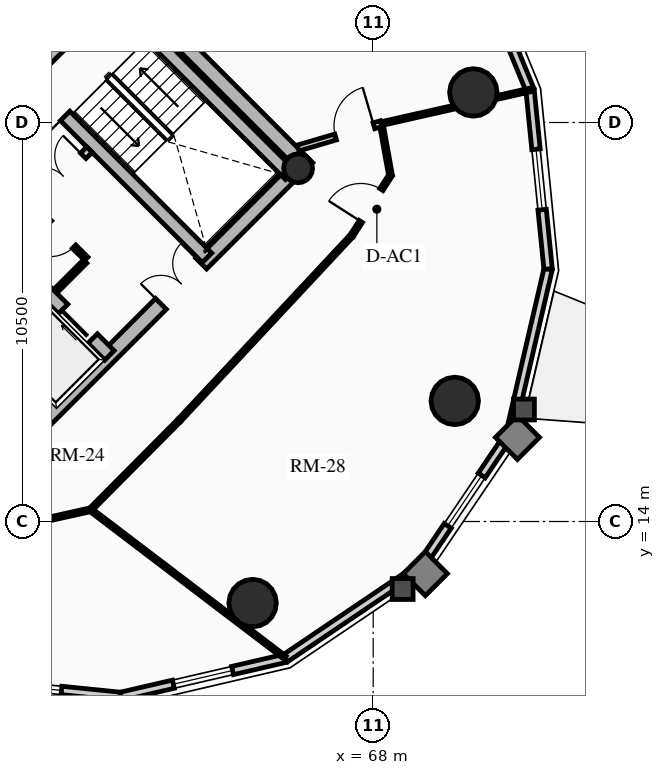
"""IFC4 building model, lengths in metres.
Left out: names, types, materials, properties, quantities, classifications, styles, units other than length and angle.
Written with IfcOpenShell. Run it as: python <this file> out.ifc"""

import sys

from ifc_helpers import new_model, si_unit, direction, frame, frame_2d, origin, origin_2d, place, context, subcontext, project, spatial, rectangle, circle, hollow_circle, extrude, source, transform, mapped, element, fill, save


model = new_model("IFC4")
c1 = context("Model", 3, precision=1e-05, world=origin(), true_north=direction((0.0, 1.0)))
c2 = subcontext(c1, "Body", "Model", "MODEL_VIEW")
j1 = project(units=[si_unit("LENGTHUNIT", "METRE"), si_unit("PLANEANGLEUNIT", "RADIAN")], contexts=[c1])
p1 = place(None, origin())
s1 = spatial("IfcSite", under=j1, at=p1, CompositionType="ELEMENT")
p2 = place(p1, origin())
s2 = spatial("IfcBuilding", under=s1, at=p2, CompositionType="ELEMENT")
p3 = place(p2, frame((0.0, 0.0, 186.52)))
s3 = spatial("IfcBuildingStorey", under=s2, at=p3, CompositionType="ELEMENT", Elevation=186.52)
p4 = place(p3, frame((66.268, 23.298, 0.0), z_axis=(0.0, 0.0, 1.0), x_axis=(-0.707106781187, 0.707106781187, 0.0)))
e1 = element("IfcWall", 1, at=p4, inside=s3, PredefinedType="SHEAR", context=c2, shape_type="SweptSolid", body=[
    extrude(rectangle(XDim=14.1, YDim=0.4, at=frame_2d((7.05, 0.0))), origin(), (0.0, 0.0, 1.0), 2.91),
])
p5 = place(p3, frame((58.561, 15.873, 0.0), z_axis=(0.0, 0.0, 1.0), x_axis=(0.707106781187, 0.707106781187, 0.0)))
e2 = element("IfcWall", 2, at=p5, inside=s3, PredefinedType="SHEAR", context=c2, shape_type="SweptSolid", body=[
    extrude(rectangle(XDim=10.7, YDim=0.4, at=frame_2d((5.35, 0.0))), origin(), (0.0, 0.0, 1.0), 2.91),
])
m1 = source(origin(), c2, "Body", "SweptSolid", [
    extrude(rectangle(XDim=1.5, YDim=2.02, at=frame_2d((0.75, 1.01))), frame((0.0, 0.21, 0.0), z_axis=(0.0, -1.0, 0.0), x_axis=(1.0, 0.0, 0.0)), (0.0, 0.0, 1.0), 0.42),
])
p6 = place(p5, frame((5.45, 0.0, 0.0)))
e3 = element("IfcOpeningElement", 3, at=p6, cuts=e2, PredefinedType="OPENING", context=c2, shape_type="MappedRepresentation", body=[
    mapped(m1, transform((0.0, 0.0, 0.0), x_axis=(1.0, 0.0, 0.0), y_axis=(0.0, 1.0, 0.0), z_axis=(0.0, 0.0, 1.0), scale=1.0)),
])
p7 = place(p3, frame((61.06, 18.373, 0.0), z_axis=(0.0, 0.0, 1.0), x_axis=(-0.707106781187, 0.707106781187, 0.0)))
e4 = element("IfcWall", 4, at=p7, inside=s3, PredefinedType="SHEAR", context=c2, shape_type="SweptSolid", body=[
    extrude(rectangle(XDim=13.7, YDim=0.35, at=frame_2d((6.85, 0.0))), origin(), (0.0, 0.0, 1.0), 2.91),
])
m2 = source(origin(), c2, "Body", "SweptSolid", [
    extrude(rectangle(XDim=1.1, YDim=2.015, at=frame_2d((0.55, 1.007))), frame((0.0, 0.185, 0.0), z_axis=(0.0, -1.0, 0.0), x_axis=(1.0, 0.0, 0.0)), (0.0, 0.0, 1.0), 0.37),
])
p8 = place(p7, frame((4.85, 0.0, 0.0)))
e5 = element("IfcOpeningElement", 5, at=p8, cuts=e4, PredefinedType="OPENING", context=c2, shape_type="MappedRepresentation", body=[
    mapped(m2, transform((0.0, 0.0, 0.0), x_axis=(1.0, 0.0, 0.0), y_axis=(0.0, 1.0, 0.0), z_axis=(0.0, 0.0, 1.0), scale=1.0)),
])
p9 = place(p7, frame((0.625, 0.0, 0.0)))
e6 = element("IfcOpeningElement", 6, at=p9, cuts=e4, PredefinedType="OPENING", context=c2, shape_type="MappedRepresentation", body=[
    mapped(m2, transform((0.0, 0.0, 0.0), x_axis=(1.0, 0.0, 0.0), y_axis=(0.0, 1.0, 0.0), z_axis=(0.0, 0.0, 1.0), scale=1.0)),
])
p10 = place(p7, frame((2.625, 0.0, 0.0)))
e7 = element("IfcOpeningElement", 7, at=p10, cuts=e4, PredefinedType="OPENING", context=c2, shape_type="MappedRepresentation", body=[
    mapped(m2, transform((0.0, 0.0, 0.0), x_axis=(1.0, 0.0, 0.0), y_axis=(0.0, 1.0, 0.0), z_axis=(0.0, 0.0, 1.0), scale=1.0)),
])
m3 = source(origin(), c2, "Body", "SweptSolid", [
    extrude(rectangle(XDim=1.15, YDim=2.02, at=frame_2d((0.575, 1.01))), frame((0.0, 0.185, 0.0), z_axis=(0.0, -1.0, 0.0), x_axis=(1.0, 0.0, 0.0)), (0.0, 0.0, 1.0), 0.37),
])
p11 = place(p7, frame((7.27, 0.0, 0.0)))
e8 = element("IfcOpeningElement", 8, at=p11, cuts=e4, PredefinedType="OPENING", context=c2, shape_type="MappedRepresentation", body=[
    mapped(m3, transform((0.0, 0.0, 0.0), x_axis=(1.0, 0.0, 0.0), y_axis=(0.0, 1.0, 0.0), z_axis=(0.0, 0.0, 1.0), scale=1.0)),
])
p12 = place(p3, frame((63.627, 20.94, 0.0), z_axis=(0.0, 0.0, 1.0), x_axis=(-0.707119496762, 0.707094065383, 0.0)))
e9 = element("IfcWall", 9, at=p12, inside=s3, PredefinedType="SHEAR", context=c2, shape_type="SweptSolid", body=[
    extrude(rectangle(XDim=9.6, YDim=0.35, at=frame_2d((4.8, 0.0))), origin(), (0.0, 0.0, 1.0), 2.91),
])
p13 = place(p12, frame((5.28, 0.0, 0.0)))
e10 = element("IfcOpeningElement", 10, at=p13, cuts=e9, PredefinedType="OPENING", context=c2, shape_type="MappedRepresentation", body=[
    mapped(m3, transform((0.0, 0.0, 0.0), x_axis=(1.0, 0.0, 0.0), y_axis=(0.0, 1.0, 0.0), z_axis=(0.0, 0.0, 1.0), scale=1.0)),
])
p14 = place(p3, frame((65.812, 23.125, 0.0), z_axis=(0.0, 0.0, 1.0), x_axis=(-0.707106781187, 0.707106781187, 0.0)))
e11 = element("IfcWall", 11, at=p14, inside=s3, PredefinedType="SHEAR", context=c2, shape_type="SweptSolid", body=[
    extrude(rectangle(XDim=6.695, YDim=0.35, at=frame_2d((3.348, 0.0))), origin(), (0.0, 0.0, 1.0), 2.91),
])
p15 = place(p3, frame((58.893, 25.674, 0.0), z_axis=(0.0, 0.0, 1.0), x_axis=(0.707106781187, 0.707106781187, 0.0)))
e12 = element("IfcWall", 12, at=p15, inside=s3, PredefinedType="SHEAR", context=c2, shape_type="SweptSolid", body=[
    extrude(rectangle(XDim=3.285, YDim=0.35, at=frame_2d((1.643, 0.0))), origin(), (0.0, 0.0, 1.0), 2.91),
])
p16 = place(p3, frame((66.024, 23.294, 0.0), z_axis=(0.0, 0.0, 1.0), x_axis=(0.707106781187, 0.707106781187, 0.0)))
e13 = element("IfcColumn", 13, at=p16, inside=s3, PredefinedType="COLUMN", context=c2, shape_type="SweptSolid", body=[
    extrude(hollow_circle(Radius=0.38, WallThickness=0.032, at=origin_2d()), origin(), (0.0, 0.0, 1.0), 2.91),
])
for number, where, z_axis, x_axis in (
    (14, (64.827, 11.854, 0.0), (0.0, 0.0, 1.0), (1.0, 0.0, 0.0)),
    (15, (70.146, 17.173, 0.0), (0.0, 0.0, 1.0), (1.0, 0.0, 0.0)),
    (16, (70.635, 25.291, 0.0), (0.0, 0.0, 1.0), (1.0, 0.0, 0.0)),
):
    element("IfcColumn", number, at=place(p3, frame(where, z_axis=z_axis, x_axis=x_axis)), inside=s3, PredefinedType="USERDEFINED", context=c2, shape_type="SweptSolid", body=[
        extrude(circle(Radius=0.625, at=origin_2d()), origin(), (0.0, 0.0, 1.0), 2.91),
    ])
p17 = place(p3, frame((61.355, 9.397, 0.0), z_axis=(0.0, 0.0, 1.0), x_axis=(-0.994943283129, 0.100438356004, 0.0)))
e17 = element("IfcWall", 17, at=p17, inside=s3, PredefinedType="SOLIDWALL", context=c2, shape_type="SweptSolid", body=[
    extrude(rectangle(XDim=4.733, YDim=0.22, at=frame_2d((2.366, 0.0))), origin(), (0.0, 0.0, 1.0), 2.245),
])
m4 = source(origin(), c2, "Body", "SweptSolid", [
    extrude(rectangle(XDim=1.6, YDim=1.3, at=frame_2d((0.8, 0.65))), frame((0.0, 0.12, 0.0), z_axis=(0.0, -1.0, 0.0), x_axis=(1.0, 0.0, 0.0)), (0.0, 0.0, 1.0), 0.24),
])
p18 = place(p17, frame((1.566, 0.0, 0.65)))
e18 = element("IfcOpeningElement", 18, at=p18, cuts=e17, PredefinedType="OPENING", context=c2, shape_type="MappedRepresentation", body=[
    mapped(m4, transform((0.0, 0.0, 0.0), x_axis=(1.0, 0.0, 0.0), y_axis=(0.0, 1.0, 0.0), z_axis=(0.0, 0.0, 1.0), scale=1.0)),
])
p19 = place(p3, frame((65.687, 10.4, 0.0), z_axis=(0.0, 0.0, 1.0), x_axis=(-0.97422620202, -0.22557328587, 0.0)))
e19 = element("IfcWall", 19, at=p19, inside=s3, PredefinedType="SOLIDWALL", context=c2, shape_type="SweptSolid", body=[
    extrude(rectangle(XDim=4.446, YDim=0.22, at=frame_2d((2.223, 0.0))), origin(), (0.0, 0.0, 1.0), 2.245),
])
p20 = place(p19, frame((1.423, 0.0, 0.65)))
e20 = element("IfcOpeningElement", 20, at=p20, cuts=e19, PredefinedType="OPENING", context=c2, shape_type="MappedRepresentation", body=[
    mapped(m4, transform((0.0, 0.0, 0.0), x_axis=(1.0, 0.0, 0.0), y_axis=(0.0, 1.0, 0.0), z_axis=(0.0, 0.0, 1.0), scale=1.0)),
])
p21 = place(p3, frame((69.217, 12.783, 0.0), z_axis=(0.0, 0.0, 1.0), x_axis=(-0.828817439852, -0.55951912514, 0.0)))
e21 = element("IfcWall", 21, at=p21, inside=s3, PredefinedType="SOLIDWALL", context=c2, shape_type="SweptSolid", body=[
    extrude(rectangle(XDim=4.259, YDim=0.22, at=frame_2d((2.129, 0.0))), origin(), (0.0, 0.0, 1.0), 2.245),
])
p22 = place(p3, frame((71.6, 16.313, 0.0), z_axis=(0.0, 0.0, 1.0), x_axis=(-0.55951912514, -0.828817439852, 0.0)))
e22 = element("IfcWall", 22, at=p22, inside=s3, PredefinedType="SOLIDWALL", context=c2, shape_type="SweptSolid", body=[
    extrude(rectangle(XDim=4.259, YDim=0.22, at=frame_2d((2.129, 0.0))), origin(), (0.0, 0.0, 1.0), 2.245),
])
p23 = place(p22, frame((1.33, 0.0, 0.65)))
e23 = element("IfcOpeningElement", 23, at=p23, cuts=e22, PredefinedType="OPENING", context=c2, shape_type="MappedRepresentation", body=[
    mapped(m4, transform((0.0, 0.0, 0.0), x_axis=(1.0, 0.0, 0.0), y_axis=(0.0, 1.0, 0.0), z_axis=(0.0, 0.0, 1.0), scale=1.0)),
])
p24 = place(p3, frame((72.603, 20.645, 0.0), z_axis=(0.0, 0.0, 1.0), x_axis=(-0.22557328587, -0.97422620202, 0.0)))
e24 = element("IfcWall", 24, at=p24, inside=s3, PredefinedType="SOLIDWALL", context=c2, shape_type="SweptSolid", body=[
    extrude(rectangle(XDim=4.446, YDim=0.22, at=frame_2d((2.223, 0.0))), origin(), (0.0, 0.0, 1.0), 2.245),
])
p25 = place(p3, frame((72.127, 25.354, 0.0), z_axis=(0.0, 0.0, 1.0), x_axis=(0.100438356004, -0.994943283129, 0.0)))
e25 = element("IfcWall", 25, at=p25, inside=s3, PredefinedType="SOLIDWALL", context=c2, shape_type="SweptSolid", body=[
    extrude(rectangle(XDim=4.733, YDim=0.22, at=frame_2d((2.366, 0.0))), origin(), (0.0, 0.0, 1.0), 2.245),
])
p26 = place(p25, frame((1.566, 0.0, 0.65)))
e26 = element("IfcOpeningElement", 26, at=p26, cuts=e25, PredefinedType="OPENING", context=c2, shape_type="MappedRepresentation", body=[
    mapped(m4, transform((0.0, 0.0, 0.0), x_axis=(1.0, 0.0, 0.0), y_axis=(0.0, 1.0, 0.0), z_axis=(0.0, 0.0, 1.0), scale=1.0)),
])
p27 = place(p3, frame((70.22, 29.979, 0.0), z_axis=(0.0, 0.0, 1.0), x_axis=(0.381196434348, -0.924494066201, 0.0)))
e27 = element("IfcWall", 27, at=p27, inside=s3, PredefinedType="SOLIDWALL", context=c2, shape_type="SweptSolid", body=[
    extrude(rectangle(XDim=5.003, YDim=0.22, at=frame_2d((2.501, 0.0))), origin(), (0.0, 0.0, 1.0), 2.245),
])
p28 = place(p3, frame((58.214, 21.467, 0.0), z_axis=(0.0, 0.0, 1.0), x_axis=(0.707106781187, 0.707106781187, 0.0)))
e28 = element("IfcWall", 28, at=p28, inside=s3, PredefinedType="PARTITIONING", context=c2, shape_type="SweptSolid", body=[
    extrude(rectangle(XDim=3.28, YDim=0.2, at=frame_2d((1.64, 0.0))), origin(), (0.0, 0.0, 1.0), 2.675),
])
m5 = source(origin(), c2, "Body", "SweptSolid", [
    extrude(rectangle(XDim=1.5, YDim=2.02, at=frame_2d((0.75, 1.01))), frame((0.0, 0.11, 0.0), z_axis=(0.0, -1.0, 0.0), x_axis=(1.0, 0.0, 0.0)), (0.0, 0.0, 1.0), 0.22),
])
p29 = place(p28, frame((1.55, 0.0, 0.0)))
e29 = element("IfcOpeningElement", 29, at=p29, cuts=e28, PredefinedType="OPENING", context=c2, shape_type="MappedRepresentation", body=[
    mapped(m5, transform((0.0, 0.0, 0.0), x_axis=(1.0, 0.0, 0.0), y_axis=(0.0, 1.0, 0.0), z_axis=(0.0, 0.0, 1.0), scale=1.0)),
])
p30 = place(p3, frame((60.448, 20.915, 0.0), z_axis=(0.0, 0.0, 1.0), x_axis=(-0.707106781187, 0.707106781187, 0.0)))
e30 = element("IfcWall", 30, at=p30, inside=s3, PredefinedType="PARTITIONING", context=c2, shape_type="SweptSolid", body=[
    extrude(rectangle(XDim=1.87, YDim=0.125, at=frame_2d((0.935, 0.0))), origin(), (0.0, 0.0, 1.0), 2.675),
])
m6 = source(origin(), c2, "Body", "SweptSolid", [
    extrude(rectangle(XDim=0.9, YDim=2.005, at=frame_2d((0.45, 1.002))), frame((0.0, 0.073, 0.0), z_axis=(0.0, -1.0, 0.0), x_axis=(1.0, 0.0, 0.0)), (0.0, 0.0, 1.0), 0.145),
])
p31 = place(p30, frame((0.45, 0.0, 0.0)))
e31 = element("IfcOpeningElement", 31, at=p31, cuts=e30, PredefinedType="OPENING", context=c2, shape_type="MappedRepresentation", body=[
    mapped(m6, transform((0.0, 0.0, 0.0), x_axis=(1.0, 0.0, 0.0), y_axis=(0.0, 1.0, 0.0), z_axis=(0.0, 0.0, 1.0), scale=1.0)),
])
p32 = place(p3, frame((59.643, 20.066, 0.0), z_axis=(0.0, 0.0, 1.0), x_axis=(0.707106781187, 0.707106781187, 0.0)))
e32 = element("IfcWall", 32, at=p32, inside=s3, PredefinedType="PARTITIONING", context=c2, shape_type="SweptSolid", body=[
    extrude(rectangle(XDim=1.1, YDim=0.125, at=frame_2d((0.55, 0.0))), origin(), (0.0, 0.0, 1.0), 2.675),
])
p33 = place(p3, frame((59.008, 13.963, 0.0), z_axis=(0.0, 0.0, 1.0), x_axis=(0.976020856791, 0.21767702476, 0.0)))
e33 = element("IfcWall", 33, at=p33, inside=s3, PredefinedType="MOVABLE", context=c2, shape_type="SweptSolid", body=[
    extrude(rectangle(XDim=1.593, YDim=0.1, at=frame_2d((0.796, 0.0))), origin(), (0.0, 0.0, 1.0), 2.245),
])
p34 = place(p3, frame((60.562, 14.31, 0.0), z_axis=(0.0, 0.0, 1.0), x_axis=(0.704566236161, 0.709638230975, 0.0)))
e34 = element("IfcWall", 34, at=p34, inside=s3, PredefinedType="MOVABLE", context=c2, shape_type="SweptSolid", body=[
    extrude(rectangle(XDim=3.321, YDim=0.1, at=frame_2d((1.661, 0.0))), origin(), (0.0, 0.0, 1.0), 2.245),
])
p35 = place(p3, frame((62.903, 16.667, 0.0), z_axis=(0.0, 0.0, 1.0), x_axis=(0.682371947497, 0.731005147225, 0.0)))
e35 = element("IfcWall", 35, at=p35, inside=s3, PredefinedType="MOVABLE", context=c2, shape_type="SweptSolid", body=[
    extrude(rectangle(XDim=6.642, YDim=0.1, at=frame_2d((3.321, 0.0))), origin(), (0.0, 0.0, 1.0), 2.245),
])
p36 = place(p3, frame((67.435, 21.521, 0.0), z_axis=(0.0, 0.0, 1.0), x_axis=(0.540777197838, 0.841165870859, 0.0)))
e36 = element("IfcWall", 36, at=p36, inside=s3, PredefinedType="MOVABLE", context=c2, shape_type="SweptSolid", body=[
    extrude(rectangle(XDim=1.888, YDim=0.1, at=frame_2d((0.944, 0.0))), origin(), (0.0, 0.0, 1.0), 2.245),
])
m7 = source(origin(), c2, "Body", "SweptSolid", [
    extrude(rectangle(XDim=1.0, YDim=2.015, at=frame_2d((0.5, 1.007))), frame((0.0, 0.06, 0.0), z_axis=(0.0, -1.0, 0.0), x_axis=(1.0, 0.0, 0.0)), (0.0, 0.0, 1.0), 0.12),
])
p37 = place(p36, frame((0.444, 0.0, 0.0)))
e37 = element("IfcOpeningElement", 37, at=p37, cuts=e36, PredefinedType="OPENING", context=c2, shape_type="MappedRepresentation", body=[
    mapped(m7, transform((0.0, 0.0, 0.0), x_axis=(1.0, 0.0, 0.0), y_axis=(0.0, 1.0, 0.0), z_axis=(0.0, 0.0, 1.0), scale=1.0)),
])
p38 = place(p3, frame((68.456, 23.11, 0.0), z_axis=(0.0, 0.0, 1.0), x_axis=(-0.1772522795, 0.984165448191, 0.0)))
e38 = element("IfcWall", 38, at=p38, inside=s3, PredefinedType="MOVABLE", context=c2, shape_type="SweptSolid", body=[
    extrude(rectangle(XDim=1.382, YDim=0.1, at=frame_2d((0.691, 0.0))), origin(), (0.0, 0.0, 1.0), 2.245),
])
p39 = place(p3, frame((60.562, 14.31, 0.0), z_axis=(0.0, 0.0, 1.0), x_axis=(0.795846601014, -0.605498296987, 0.0)))
e39 = element("IfcWall", 39, at=p39, inside=s3, PredefinedType="MOVABLE", context=c2, shape_type="SweptSolid", body=[
    extrude(rectangle(XDim=6.427, YDim=0.1, at=frame_2d((3.213, 0.0))), origin(), (0.0, 0.0, 1.0), 2.245),
])
p40 = place(p3, frame((68.211, 24.469, 0.0), z_axis=(0.0, 0.0, 1.0), x_axis=(0.975366409574, 0.220590949666, 0.0)))
e40 = element("IfcWall", 40, at=p40, inside=s3, PredefinedType="MOVABLE", context=c2, shape_type="SweptSolid", body=[
    extrude(rectangle(XDim=3.995, YDim=0.1, at=frame_2d((1.998, 0.0))), origin(), (0.0, 0.0, 1.0), 2.245),
])
p41 = place(p3, frame((66.021, 23.828, 0.0), z_axis=(0.0, 0.0, 1.0), x_axis=(0.959727558294, 0.280932400856, 0.0)))
e41 = element("IfcWall", 41, at=p41, inside=s3, PredefinedType="PARTITIONING", context=c2, shape_type="SweptSolid", body=[
    extrude(rectangle(XDim=2.282, YDim=0.16, at=frame_2d((1.141, 0.0))), origin(), (0.0, 0.0, 1.0), 2.245),
])
m8 = source(origin(), c2, "Body", "SweptSolid", [
    extrude(rectangle(XDim=1.05, YDim=2.015, at=frame_2d((0.525, 1.007))), frame((0.0, 0.09, 0.0), z_axis=(0.0, -1.0, 0.0), x_axis=(1.0, 0.0, 0.0)), (0.0, 0.0, 1.0), 0.18),
])
p42 = place(p41, frame((1.032, 0.0, 0.0)))
e42 = element("IfcOpeningElement", 42, at=p42, cuts=e41, PredefinedType="OPENING", context=c2, shape_type="MappedRepresentation", body=[
    mapped(m8, transform((0.0, 0.0, 0.0), x_axis=(1.0, 0.0, 0.0), y_axis=(0.0, 1.0, 0.0), z_axis=(0.0, 0.0, 1.0), scale=1.0)),
])
m9 = source(origin(), c2, "Body", "SweptSolid", [
    extrude(rectangle(XDim=1.6, YDim=1.3, at=frame_2d((0.8, 0.65))), frame((0.0, 0.03, 0.0), z_axis=(0.0, -1.0, 0.0), x_axis=(1.0, 0.0, 0.0)), (0.0, 0.0, 1.0), 0.06),
])
p43 = place(p18, origin())
e43 = element("IfcWindow", 43, at=p43, inside=s3, PartitioningType="SINGLE_PANEL", PredefinedType="WINDOW", context=c2, shape_type="MappedRepresentation", body=[
    mapped(m9, transform((0.0, 0.0, 0.0), x_axis=(1.0, 0.0, 0.0), y_axis=(0.0, 1.0, 0.0), z_axis=(0.0, 0.0, 1.0), scale=1.0)),
])
fill(e18, e43)
p44 = place(p20, origin())
e44 = element("IfcWindow", 44, at=p44, inside=s3, PartitioningType="SINGLE_PANEL", PredefinedType="WINDOW", context=c2, shape_type="MappedRepresentation", body=[
    mapped(m9, transform((0.0, 0.0, 0.0), x_axis=(1.0, 0.0, 0.0), y_axis=(0.0, 1.0, 0.0), z_axis=(0.0, 0.0, 1.0), scale=1.0)),
])
fill(e20, e44)
p45 = place(p23, origin())
e45 = element("IfcWindow", 45, at=p45, inside=s3, PartitioningType="SINGLE_PANEL", PredefinedType="WINDOW", context=c2, shape_type="MappedRepresentation", body=[
    mapped(m9, transform((0.0, 0.0, 0.0), x_axis=(1.0, 0.0, 0.0), y_axis=(0.0, 1.0, 0.0), z_axis=(0.0, 0.0, 1.0), scale=1.0)),
])
fill(e23, e45)
p46 = place(p26, origin())
e46 = element("IfcWindow", 46, at=p46, inside=s3, PartitioningType="SINGLE_PANEL", PredefinedType="WINDOW", context=c2, shape_type="MappedRepresentation", body=[
    mapped(m9, transform((0.0, 0.0, 0.0), x_axis=(1.0, 0.0, 0.0), y_axis=(0.0, 1.0, 0.0), z_axis=(0.0, 0.0, 1.0), scale=1.0)),
])
fill(e26, e46)
m10 = source(origin(), c2, "Body", "SweptSolid", [
    extrude(rectangle(XDim=1.1, YDim=2.015, at=frame_2d((0.55, 1.007))), frame((0.0, 0.025, 0.0), z_axis=(0.0, -1.0, 0.0), x_axis=(1.0, 0.0, 0.0)), (0.0, 0.0, 1.0), 0.05),
])
p47 = place(p9, origin())
e47 = element("IfcDoor", 47, at=p47, inside=s3, OperationType="SLIDING_TO_RIGHT", PredefinedType="DOOR", context=c2, shape_type="MappedRepresentation", body=[
    mapped(m10, transform((0.0, 0.0, 0.0), x_axis=(1.0, 0.0, 0.0), y_axis=(0.0, 1.0, 0.0), z_axis=(0.0, 0.0, 1.0), scale=1.0)),
])
fill(e6, e47)
m11 = source(origin(), c2, "Body", "SweptSolid", [
    extrude(rectangle(XDim=1.15, YDim=2.02, at=frame_2d((0.575, 1.01))), frame((0.0, 0.025, 0.0), z_axis=(0.0, -1.0, 0.0), x_axis=(1.0, 0.0, 0.0)), (0.0, 0.0, 1.0), 0.05),
])
p48 = place(p13, origin())
e48 = element("IfcDoor", 48, at=p48, inside=s3, OperationType="SINGLE_SWING_LEFT", PredefinedType="DOOR", context=c2, shape_type="MappedRepresentation", body=[
    mapped(m11, transform((0.0, 0.0, 0.0), x_axis=(1.0, 0.0, 0.0), y_axis=(0.0, 1.0, 0.0), z_axis=(0.0, 0.0, 1.0), scale=1.0)),
])
fill(e10, e48)
m12 = source(origin(), c2, "Body", "SweptSolid", [
    extrude(rectangle(XDim=1.5, YDim=2.02, at=frame_2d((0.75, 1.01))), frame((0.0, 0.025, 0.0), z_axis=(0.0, -1.0, 0.0), x_axis=(1.0, 0.0, 0.0)), (0.0, 0.0, 1.0), 0.05),
])
p49 = place(p6, origin())
e49 = element("IfcDoor", 49, at=p49, inside=s3, OperationType="DOUBLE_DOOR_SINGLE_SWING", PredefinedType="DOOR", context=c2, shape_type="MappedRepresentation", body=[
    mapped(m12, transform((0.0, 0.0, 0.0), x_axis=(1.0, 0.0, 0.0), y_axis=(0.0, 1.0, 0.0), z_axis=(0.0, 0.0, 1.0), scale=1.0)),
])
fill(e3, e49)
p50 = place(p29, origin())
e50 = element("IfcDoor", 50, at=p50, inside=s3, OperationType="DOUBLE_DOOR_SINGLE_SWING", PredefinedType="DOOR", context=c2, shape_type="MappedRepresentation", body=[
    mapped(m12, transform((0.0, 0.0, 0.0), x_axis=(1.0, 0.0, 0.0), y_axis=(0.0, 1.0, 0.0), z_axis=(0.0, 0.0, 1.0), scale=1.0)),
])
fill(e29, e50)
m13 = source(origin(), c2, "Body", "SweptSolid", [
    extrude(rectangle(XDim=0.9, YDim=2.005, at=frame_2d((0.45, 1.002))), frame((0.0, 0.025, 0.0), z_axis=(0.0, -1.0, 0.0), x_axis=(1.0, 0.0, 0.0)), (0.0, 0.0, 1.0), 0.05),
])
p51 = place(p31, origin())
e51 = element("IfcDoor", 51, at=p51, inside=s3, OperationType="SINGLE_SWING_RIGHT", PredefinedType="DOOR", context=c2, shape_type="MappedRepresentation", body=[
    mapped(m13, transform((0.0, 0.0, 0.0), x_axis=(1.0, 0.0, 0.0), y_axis=(0.0, 1.0, 0.0), z_axis=(0.0, 0.0, 1.0), scale=1.0)),
])
fill(e31, e51)
m14 = source(origin(), c2, "Body", "SweptSolid", [
    extrude(rectangle(XDim=1.05, YDim=2.015, at=frame_2d((0.525, 1.007))), frame((0.0, 0.025, 0.0), z_axis=(0.0, -1.0, 0.0), x_axis=(1.0, 0.0, 0.0)), (0.0, 0.0, 1.0), 0.05),
])
p52 = place(p42, origin())
e52 = element("IfcDoor", 52, at=p52, inside=s3, OperationType="SINGLE_SWING_RIGHT", PredefinedType="DOOR", context=c2, shape_type="MappedRepresentation", body=[
    mapped(m14, transform((0.0, 0.0, 0.0), x_axis=(1.0, 0.0, 0.0), y_axis=(0.0, 1.0, 0.0), z_axis=(0.0, 0.0, 1.0), scale=1.0)),
])
fill(e42, e52)
m15 = source(origin(), c2, "Body", "SweptSolid", [
    extrude(rectangle(XDim=1.0, YDim=2.015, at=frame_2d((0.5, 1.007))), frame((0.0, 0.025, 0.0), z_axis=(0.0, -1.0, 0.0), x_axis=(1.0, 0.0, 0.0)), (0.0, 0.0, 1.0), 0.05),
])
p53 = place(p37, origin())
e53 = element("IfcDoor", 53, at=p53, inside=s3, OperationType="SINGLE_SWING_LEFT", PredefinedType="DOOR", context=c2, shape_type="MappedRepresentation", body=[
    mapped(m15, transform((0.0, 0.0, 0.0), x_axis=(1.0, 0.0, 0.0), y_axis=(0.0, 1.0, 0.0), z_axis=(0.0, 0.0, 1.0), scale=1.0)),
])
fill(e37, e53)
save(model, sys.argv[1])
